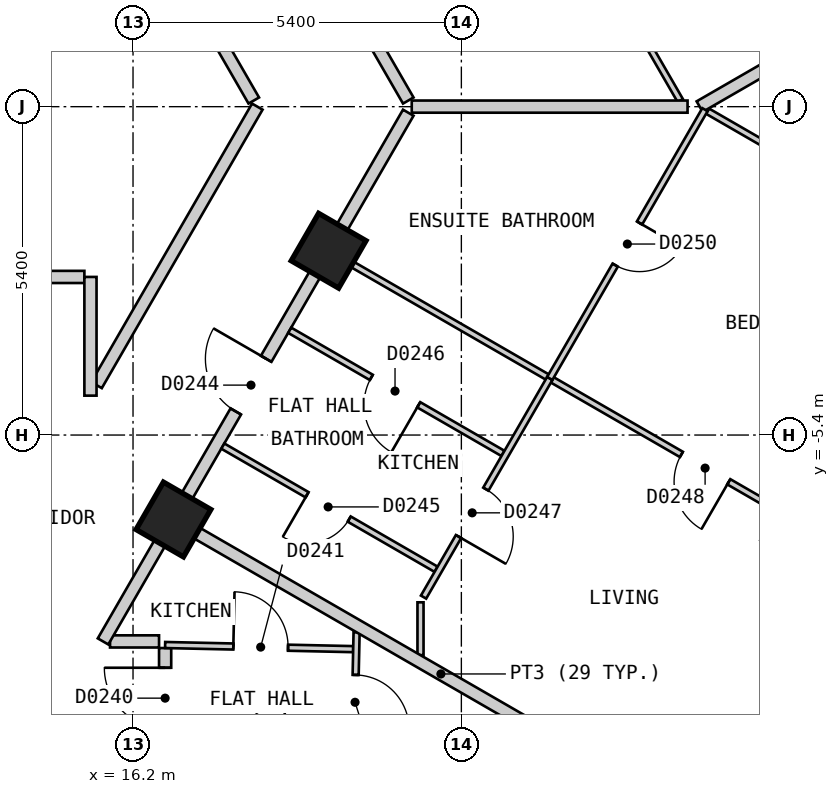
"""IFC4 building model, lengths in metres.
Left out: names, types, materials, properties, quantities, classifications, styles, units other than length and angle.
Written with IfcOpenShell. Run it as: python <this file> out.ifc"""

import sys

from ifc_helpers import new_model, si_unit, direction, frame, frame_2d, origin, origin_2d, place, context, subcontext, project, spatial, polyline, rectangle, outline, extrude, element, fill, save


model = new_model("IFC4")
c1 = context("Model", 3, precision=1e-05, world=origin(), true_north=direction((0.0, 1.0)))
c2 = subcontext(c1, "Body", "Model", "MODEL_VIEW")
j1 = project(units=[si_unit("LENGTHUNIT", "METRE"), si_unit("PLANEANGLEUNIT", "RADIAN")], contexts=[c1])
p1 = place(None, origin())
s1 = spatial("IfcSite", under=j1, at=p1, CompositionType="ELEMENT")
p2 = place(p1, origin())
s2 = spatial("IfcBuilding", under=s1, at=p2, CompositionType="ELEMENT")
p3 = place(p2, frame((0.0, 0.0, 47.4)))
s3 = spatial("IfcBuildingStorey", under=s2, at=p3, CompositionType="ELEMENT", Elevation=47.4)
for number, where, z_axis, x_axis in (
    (1, (16.865, -6.789, 0.0), (0.0, 0.0, 1.0), (0.5, 0.866, 0.0)),
    (2, (19.417, -2.369, 0.0), (0.0, 0.0, 1.0), (0.5, 0.866, 0.0)),
):
    element("IfcColumn", number, at=place(p3, frame(where, z_axis=z_axis, x_axis=x_axis)), inside=s3, PredefinedType="COLUMN", context=c2, shape_type="SweptSolid", body=[
        extrude(rectangle(XDim=0.9, YDim=0.9, at=origin_2d()), origin(), (0.0, 0.0, 1.0), 3.0),
    ])
p4 = place(p3, frame((17.71, -25.825, 0.0), z_axis=(0.0, 0.0, 1.0), x_axis=(0.500001938803, 0.866024284413, 0.0)))
e3 = element("IfcWall", 3, at=p4, inside=s3, PredefinedType="SOLIDWALL", context=c2, shape_type="SweptSolid", body=[
    extrude(outline(polyline([(0.0, -0.15), (27.02, -0.15), (26.94, 0.15), (0.08, 0.15), (0.0, -0.15)])), origin(), (0.0, 0.0, 1.0), 2.7),
])
p5 = place(p4, frame((1.277, 0.0, 0.15)))
e4 = element("IfcOpeningElement", 4, at=p5, cuts=e3, PredefinedType="OPENING", context=c2, shape_type="SweptSolid", body=[
    extrude(rectangle(XDim=1.5, YDim=2.1, at=frame_2d((0.75, 1.05))), frame((0.0, 0.16, 0.0), z_axis=(0.0, -1.0, 0.0), x_axis=(1.0, 0.0, 0.0)), (0.0, 0.0, 1.0), 0.32),
])
p6 = place(p4, frame((3.829, 0.0, 0.15)))
e5 = element("IfcOpeningElement", 5, at=p6, cuts=e3, PredefinedType="OPENING", context=c2, shape_type="SweptSolid", body=[
    extrude(rectangle(XDim=1.5, YDim=2.1, at=frame_2d((0.75, 1.05))), frame((0.0, 0.16, 0.0), z_axis=(0.0, -1.0, 0.0), x_axis=(1.0, 0.0, 0.0)), (0.0, 0.0, 1.0), 0.32),
])
p7 = place(p4, frame((6.382, 0.0, 0.15)))
e6 = element("IfcOpeningElement", 6, at=p7, cuts=e3, PredefinedType="OPENING", context=c2, shape_type="SweptSolid", body=[
    extrude(rectangle(XDim=1.5, YDim=2.1, at=frame_2d((0.75, 1.05))), frame((0.0, 0.16, 0.0), z_axis=(0.0, -1.0, 0.0), x_axis=(1.0, 0.0, 0.0)), (0.0, 0.0, 1.0), 0.32),
])
p8 = place(p4, frame((8.933, 0.0, 0.15)))
e7 = element("IfcOpeningElement", 7, at=p8, cuts=e3, PredefinedType="OPENING", context=c2, shape_type="SweptSolid", body=[
    extrude(rectangle(XDim=1.5, YDim=2.1, at=frame_2d((0.75, 1.05))), frame((0.0, 0.16, 0.0), z_axis=(0.0, -1.0, 0.0), x_axis=(1.0, 0.0, 0.0)), (0.0, 0.0, 1.0), 0.32),
])
p9 = place(p4, frame((11.485, 0.0, 0.15)))
e8 = element("IfcOpeningElement", 8, at=p9, cuts=e3, PredefinedType="OPENING", context=c2, shape_type="SweptSolid", body=[
    extrude(rectangle(XDim=1.5, YDim=2.1, at=frame_2d((0.75, 1.05))), frame((0.0, 0.16, 0.0), z_axis=(0.0, -1.0, 0.0), x_axis=(1.0, 0.0, 0.0)), (0.0, 0.0, 1.0), 0.32),
])
p10 = place(p4, frame((14.037, 0.0, 0.15)))
e9 = element("IfcOpeningElement", 9, at=p10, cuts=e3, PredefinedType="OPENING", context=c2, shape_type="SweptSolid", body=[
    extrude(rectangle(XDim=1.5, YDim=2.1, at=frame_2d((0.75, 1.05))), frame((0.0, 0.16, 0.0), z_axis=(0.0, -1.0, 0.0), x_axis=(1.0, 0.0, 0.0)), (0.0, 0.0, 1.0), 0.32),
])
p11 = place(p4, frame((16.589, 0.0, 0.15)))
e10 = element("IfcOpeningElement", 10, at=p11, cuts=e3, PredefinedType="OPENING", context=c2, shape_type="SweptSolid", body=[
    extrude(rectangle(XDim=1.5, YDim=2.1, at=frame_2d((0.75, 1.05))), frame((0.0, 0.16, 0.0), z_axis=(0.0, -1.0, 0.0), x_axis=(1.0, 0.0, 0.0)), (0.0, 0.0, 1.0), 0.32),
])
p12 = place(p4, frame((19.141, 0.0, 0.15)))
e11 = element("IfcOpeningElement", 11, at=p12, cuts=e3, PredefinedType="OPENING", context=c2, shape_type="SweptSolid", body=[
    extrude(rectangle(XDim=1.5, YDim=2.1, at=frame_2d((0.75, 1.05))), frame((0.0, 0.16, 0.0), z_axis=(0.0, -1.0, 0.0), x_axis=(1.0, 0.0, 0.0)), (0.0, 0.0, 1.0), 0.32),
])
p13 = place(p4, frame((21.693, 0.0, 0.15)))
e12 = element("IfcOpeningElement", 12, at=p13, cuts=e3, PredefinedType="OPENING", context=c2, shape_type="SweptSolid", body=[
    extrude(rectangle(XDim=1.5, YDim=2.1, at=frame_2d((0.75, 1.05))), frame((0.0, 0.16, 0.0), z_axis=(0.0, -1.0, 0.0), x_axis=(1.0, 0.0, 0.0)), (0.0, 0.0, 1.0), 0.32),
])
p14 = place(p4, frame((24.244, 0.0, 0.15)))
e13 = element("IfcOpeningElement", 13, at=p14, cuts=e3, PredefinedType="OPENING", context=c2, shape_type="SweptSolid", body=[
    extrude(rectangle(XDim=1.5, YDim=2.1, at=frame_2d((0.75, 1.05))), frame((0.0, 0.16, 0.0), z_axis=(0.0, -1.0, 0.0), x_axis=(1.0, 0.0, 0.0)), (0.0, 0.0, 1.0), 0.32),
])
p15 = place(p3, frame((9.18, 15.7, 0.0), z_axis=(0.0, 0.0, 1.0), x_axis=(0.500003652032, -0.866023295272, 0.0)))
e14 = element("IfcWall", 14, at=p15, inside=s3, PredefinedType="PARTITIONING", context=c2, shape_type="SweptSolid", body=[
    extrude(rectangle(XDim=18.012, YDim=0.2, at=frame_2d((9.006, 0.0))), origin(), (0.0, 0.0, 1.0), 2.7),
])
p16 = place(p15, frame((8.556, 0.0, 0.0)))
e15 = element("IfcOpeningElement", 15, at=p16, cuts=e14, PredefinedType="OPENING", context=c2, shape_type="SweptSolid", body=[
    extrude(rectangle(XDim=0.9, YDim=2.1, at=frame_2d((0.45, 1.05))), frame((0.0, 0.11, 0.0), z_axis=(0.0, -1.0, 0.0), x_axis=(1.0, 0.0, 0.0)), (0.0, 0.0, 1.0), 0.22),
])
p17 = place(p3, frame((10.45, 17.9, 0.0), z_axis=(0.0, 0.0, 1.0), x_axis=(0.500034352617, -0.866005569383, 0.0)))
e16 = element("IfcWall", 16, at=p17, inside=s3, PredefinedType="PARTITIONING", context=c2, shape_type="SweptSolid", body=[
    extrude(rectangle(XDim=20.553, YDim=0.2, at=frame_2d((10.276, 0.0))), origin(), (0.0, 0.0, 1.0), 2.7),
])
p18 = place(p17, frame((14.879, 0.0, 0.0)))
e17 = element("IfcOpeningElement", 17, at=p18, cuts=e16, PredefinedType="OPENING", context=c2, shape_type="SweptSolid", body=[
    extrude(rectangle(XDim=1.0, YDim=2.1, at=frame_2d((0.5, 1.05))), frame((0.0, 0.11, 0.0), z_axis=(0.0, -1.0, 0.0), x_axis=(1.0, 0.0, 0.0)), (0.0, 0.0, 1.0), 0.22),
])
p19 = place(p17, frame((9.775, 0.0, 0.0)))
e18 = element("IfcOpeningElement", 18, at=p19, cuts=e16, PredefinedType="OPENING", context=c2, shape_type="SweptSolid", body=[
    extrude(rectangle(XDim=1.0, YDim=2.1, at=frame_2d((0.5, 1.05))), frame((0.0, 0.11, 0.0), z_axis=(0.0, -1.0, 0.0), x_axis=(1.0, 0.0, 0.0)), (0.0, 0.0, 1.0), 0.22),
])
p20 = place(p17, frame((4.671, 0.0, 0.0)))
e19 = element("IfcOpeningElement", 19, at=p20, cuts=e16, PredefinedType="OPENING", context=c2, shape_type="SweptSolid", body=[
    extrude(rectangle(XDim=1.0, YDim=2.1, at=frame_2d((0.5, 1.05))), frame((0.0, 0.11, 0.0), z_axis=(0.0, -1.0, 0.0), x_axis=(1.0, 0.0, 0.0)), (0.0, 0.0, 1.0), 0.22),
])
p21 = place(p3, frame((15.822, -8.794, 0.0), z_axis=(0.0, 0.0, 1.0), x_axis=(1.0, 0.0, 0.0)))
e20 = element("IfcWall", 20, at=p21, inside=s3, PredefinedType="PARTITIONING", context=c2, shape_type="SweptSolid", body=[
    extrude(rectangle(XDim=0.806, YDim=0.2, at=frame_2d((0.403, 0.0))), origin(), (0.0, 0.0, 1.0), 2.7),
])
p22 = place(p3, frame((7.028, -2.8, 0.0), z_axis=(0.0, 0.0, 1.0), x_axis=(1.0, 0.0, 0.0)))
e21 = element("IfcWall", 21, at=p22, inside=s3, PredefinedType="PARTITIONING", context=c2, shape_type="SweptSolid", body=[
    extrude(rectangle(XDim=8.372, YDim=0.2, at=frame_2d((4.186, 0.0))), origin(), (0.0, 0.0, 1.0), 2.7),
])
p23 = place(p3, frame((15.6, -4.579, 0.0), z_axis=(0.0, 0.0, 1.0), x_axis=(0.499927597274, 0.866067201483, 0.0)))
e22 = element("IfcWall", 22, at=p23, inside=s3, PredefinedType="PARTITIONING", context=c2, shape_type="SweptSolid", body=[
    extrude(rectangle(XDim=5.288, YDim=0.2, at=frame_2d((2.644, 0.0))), origin(), (0.0, 0.0, 1.0), 2.7),
])
p24 = place(p3, frame((15.707, -8.794, 0.0), z_axis=(0.0, 0.0, 1.0), x_axis=(0.500040469623, 0.866002037376, 0.0)))
e23 = element("IfcWall", 23, at=p24, inside=s3, PredefinedType="PARTITIONING", context=c2, shape_type="SweptSolid", body=[
    extrude(rectangle(XDim=2.281, YDim=0.2, at=frame_2d((1.141, 0.0))), origin(), (0.0, 0.0, 1.0), 2.7),
])
p25 = place(p3, frame((16.864, -6.789, 0.0), z_axis=(0.0, 0.0, 1.0), x_axis=(0.500058020612, 0.865991902977, 0.0)))
e24 = element("IfcWall", 24, at=p25, inside=s3, PredefinedType="PARTITIONING", context=c2, shape_type="SweptSolid", body=[
    extrude(rectangle(XDim=7.725, YDim=0.2, at=frame_2d((3.863, 0.0))), origin(), (0.0, 0.0, 1.0), 2.7),
])
p26 = place(p25, frame((2.052, 0.0, 0.0)))
e25 = element("IfcOpeningElement", 25, at=p26, cuts=e24, PredefinedType="OPENING", context=c2, shape_type="SweptSolid", body=[
    extrude(rectangle(XDim=1.0, YDim=2.1, at=frame_2d((0.5, 1.05))), frame((0.0, 0.11, 0.0), z_axis=(0.0, -1.0, 0.0), x_axis=(1.0, 0.0, 0.0)), (0.0, 0.0, 1.0), 0.22),
])
p27 = place(p3, frame((15.5, -4.752, 0.0), z_axis=(0.0, 0.0, 1.0), x_axis=(0.0, 1.0, 0.0)))
e26 = element("IfcWall", 26, at=p27, inside=s3, PredefinedType="PARTITIONING", context=c2, shape_type="SweptSolid", body=[
    extrude(rectangle(XDim=1.952, YDim=0.2, at=frame_2d((0.976, 0.0))), origin(), (0.0, 0.0, 1.0), 2.7),
])
p28 = place(p3, frame((16.728, -13.624, 0.0), z_axis=(0.0, 0.0, 1.0), x_axis=(0.0, 1.0, 0.0)))
e27 = element("IfcWall", 27, at=p28, inside=s3, PredefinedType="PARTITIONING", context=c2, shape_type="SweptSolid", body=[
    extrude(rectangle(XDim=4.721, YDim=0.2, at=frame_2d((2.36, 0.0))), origin(), (0.0, 0.0, 1.0), 2.7),
])
p29 = place(p28, frame((3.397, 0.0, 0.0)))
e28 = element("IfcOpeningElement", 28, at=p29, cuts=e27, PredefinedType="OPENING", context=c2, shape_type="SweptSolid", body=[
    extrude(rectangle(XDim=1.0, YDim=2.1, at=frame_2d((0.5, 1.05))), frame((0.0, 0.11, 0.0), z_axis=(0.0, -1.0, 0.0), x_axis=(1.0, 0.0, 0.0)), (0.0, 0.0, 1.0), 0.22),
])
p30 = place(p3, frame((22.796, 4.264, 0.0), z_axis=(0.0, 0.0, 1.0), x_axis=(0.500099052605, -0.865968208183, 0.0)))
e29 = element("IfcWall", 29, at=p30, inside=s3, PredefinedType="PARTITIONING", context=c2, shape_type="SweptSolid", body=[
    extrude(rectangle(XDim=4.807, YDim=0.1, at=frame_2d((2.404, 0.0))), origin(), (0.0, 0.0, 1.0), 2.7),
])
p31 = place(p30, frame((2.037, 0.0, 0.0)))
e30 = element("IfcOpeningElement", 30, at=p31, cuts=e29, PredefinedType="OPENING", context=c2, shape_type="SweptSolid", body=[
    extrude(rectangle(XDim=0.8, YDim=2.1, at=frame_2d((0.4, 1.05))), frame((0.0, 0.06, 0.0), z_axis=(0.0, -1.0, 0.0), x_axis=(1.0, 0.0, 0.0)), (0.0, 0.0, 1.0), 0.12),
])
p32 = place(p3, frame((16.728, -8.853, 0.0), z_axis=(0.0, 0.0, 1.0), x_axis=(0.999759332126, -0.021938045176, 0.0)))
e31 = element("IfcWall", 31, at=p32, inside=s3, PredefinedType="PARTITIONING", context=c2, shape_type="SweptSolid", body=[
    extrude(rectangle(XDim=3.094, YDim=0.1, at=frame_2d((1.547, 0.0))), origin(), (0.0, 0.0, 1.0), 2.7),
])
p33 = place(p32, frame((1.122, 0.0, 0.0)))
e32 = element("IfcOpeningElement", 32, at=p33, cuts=e31, PredefinedType="OPENING", context=c2, shape_type="SweptSolid", body=[
    extrude(rectangle(XDim=0.9, YDim=2.1, at=frame_2d((0.45, 1.05))), frame((0.0, 0.06, 0.0), z_axis=(0.0, -1.0, 0.0), x_axis=(1.0, 0.0, 0.0)), (0.0, 0.0, 1.0), 0.12),
])
p34 = place(p3, frame((17.677, -5.582, 0.0), z_axis=(0.0, 0.0, 1.0), x_axis=(0.866015917575, -0.500016430238, 0.0)))
e33 = element("IfcWall", 33, at=p34, inside=s3, PredefinedType="PARTITIONING", context=c2, shape_type="SweptSolid", body=[
    extrude(rectangle(XDim=4.05, YDim=0.1, at=frame_2d((2.025, 0.0))), origin(), (0.0, 0.0, 1.0), 2.7),
])
p35 = place(p34, frame((1.6, 0.0, 0.0)))
e34 = element("IfcOpeningElement", 34, at=p35, cuts=e33, PredefinedType="OPENING", context=c2, shape_type="SweptSolid", body=[
    extrude(rectangle(XDim=0.8, YDim=2.1, at=frame_2d((0.4, 1.05))), frame((0.0, 0.06, 0.0), z_axis=(0.0, -1.0, 0.0), x_axis=(1.0, 0.0, 0.0)), (0.0, 0.0, 1.0), 0.12),
])
p36 = place(p3, frame((18.777, -3.677, 0.0), z_axis=(0.0, 0.0, 1.0), x_axis=(0.866000843773, -0.500042536776, 0.0)))
e35 = element("IfcWall", 35, at=p36, inside=s3, PredefinedType="PARTITIONING", context=c2, shape_type="SweptSolid", body=[
    extrude(rectangle(XDim=4.05, YDim=0.1, at=frame_2d((2.025, 0.0))), origin(), (0.0, 0.0, 1.0), 2.7),
])
p37 = place(p36, frame((1.55, 0.0, 0.0)))
e36 = element("IfcOpeningElement", 36, at=p37, cuts=e35, PredefinedType="OPENING", context=c2, shape_type="SweptSolid", body=[
    extrude(rectangle(XDim=0.9, YDim=2.1, at=frame_2d((0.45, 1.05))), frame((0.0, 0.06, 0.0), z_axis=(0.0, -1.0, 0.0), x_axis=(1.0, 0.0, 0.0)), (0.0, 0.0, 1.0), 0.12),
])
p38 = place(p3, frame((19.503, -2.419, 0.0), z_axis=(0.0, 0.0, 1.0), x_axis=(0.866047370643, -0.499961950354, 0.0)))
e37 = element("IfcWall", 37, at=p38, inside=s3, PredefinedType="PARTITIONING", context=c2, shape_type="SweptSolid", body=[
    extrude(rectangle(XDim=10.001, YDim=0.1, at=frame_2d((5.0, 0.0))), origin(), (0.0, 0.0, 1.0), 2.7),
])
p39 = place(p38, frame((6.6, 0.0, 0.0)))
e38 = element("IfcOpeningElement", 38, at=p39, cuts=e37, PredefinedType="OPENING", context=c2, shape_type="SweptSolid", body=[
    extrude(rectangle(XDim=0.9, YDim=2.1, at=frame_2d((0.45, 1.05))), frame((0.0, 0.06, 0.0), z_axis=(0.0, -1.0, 0.0), x_axis=(1.0, 0.0, 0.0)), (0.0, 0.0, 1.0), 0.12),
])
p40 = place(p3, frame((25.649, -0.074, 0.0), z_axis=(0.0, 0.0, 1.0), x_axis=(0.866059819573, -0.499940385368, 0.0)))
e39 = element("IfcWall", 39, at=p40, inside=s3, PredefinedType="PARTITIONING", context=c2, shape_type="SweptSolid", body=[
    extrude(rectangle(XDim=5.851, YDim=0.1, at=frame_2d((2.925, 0.0))), origin(), (0.0, 0.0, 1.0), 2.7),
])
p41 = place(p40, frame((2.45, 0.0, 0.0)))
e40 = element("IfcOpeningElement", 40, at=p41, cuts=e39, PredefinedType="OPENING", context=c2, shape_type="SweptSolid", body=[
    extrude(rectangle(XDim=0.9, YDim=2.1, at=frame_2d((0.45, 1.05))), frame((0.0, 0.06, 0.0), z_axis=(0.0, -1.0, 0.0), x_axis=(1.0, 0.0, 0.0)), (0.0, 0.0, 1.0), 0.12),
])
p42 = place(p3, frame((20.978, -8.065, 0.0), z_axis=(0.0, 0.0, 1.0), x_axis=(0.499965068118, 0.866045570776, 0.0)))
e41 = element("IfcWall", 41, at=p42, inside=s3, PredefinedType="PARTITIONING", context=c2, shape_type="SweptSolid", body=[
    extrude(rectangle(XDim=4.152, YDim=0.1, at=frame_2d((2.076, 0.0))), origin(), (0.0, 0.0, 1.0), 2.7),
])
p43 = place(p42, frame((1.15, 0.0, 0.0)))
e42 = element("IfcOpeningElement", 42, at=p43, cuts=e41, PredefinedType="OPENING", context=c2, shape_type="SweptSolid", body=[
    extrude(rectangle(XDim=0.9, YDim=2.1, at=frame_2d((0.45, 1.05))), frame((0.0, 0.06, 0.0), z_axis=(0.0, -1.0, 0.0), x_axis=(1.0, 0.0, 0.0)), (0.0, 0.0, 1.0), 0.12),
])
p44 = place(p3, frame((19.787, -12.704, 0.0), z_axis=(0.0, 0.0, 1.0), x_axis=(0.02212326712, 0.999755250575, 0.0)))
e43 = element("IfcWall", 43, at=p44, inside=s3, PredefinedType="PARTITIONING", context=c2, shape_type="SweptSolid", body=[
    extrude(rectangle(XDim=4.061, YDim=0.1, at=frame_2d((2.031, 0.0))), origin(), (0.0, 0.0, 1.0), 2.7),
])
p45 = place(p44, frame((2.46, 0.0, 0.0)))
e44 = element("IfcOpeningElement", 44, at=p45, cuts=e43, PredefinedType="OPENING", context=c2, shape_type="SweptSolid", body=[
    extrude(rectangle(XDim=0.9, YDim=2.1, at=frame_2d((0.45, 1.05))), frame((0.0, 0.06, 0.0), z_axis=(0.0, -1.0, 0.0), x_axis=(1.0, 0.0, 0.0)), (0.0, 0.0, 1.0), 0.12),
])
p46 = place(p3, frame((20.928, -9.02, 0.0), z_axis=(0.0, 0.0, 1.0), x_axis=(0.0, 1.0, 0.0)))
e45 = element("IfcWall", 45, at=p46, inside=s3, PredefinedType="PARTITIONING", context=c2, shape_type="SweptSolid", body=[
    extrude(rectangle(XDim=0.869, YDim=0.1, at=frame_2d((0.435, 0.0))), origin(), (0.0, 0.0, 1.0), 2.7),
])
p47 = place(p3, frame((16.916, -6.819, 0.0), z_axis=(0.0, 0.0, 1.0), x_axis=(0.866028876723, -0.499993984646, 0.0)))
e46 = element("IfcWall", 46, at=p47, inside=s3, PredefinedType="PARTITIONING", context=c2, shape_type="SweptSolid", body=[
    extrude(rectangle(XDim=10.04, YDim=0.2, at=frame_2d((5.02, 0.0))), origin(), (0.0, 0.0, 1.0), 2.7),
])
p48 = place(p3, frame((20.784, 0.001, 0.0), z_axis=(0.0, 0.0, 1.0), x_axis=(1.0, 0.0, 0.0)))
e47 = element("IfcWall", 47, at=p48, inside=s3, PredefinedType="PARTITIONING", context=c2, shape_type="SweptSolid", body=[
    extrude(rectangle(XDim=4.536, YDim=0.2, at=frame_2d((2.268, 0.0))), origin(), (0.0, 0.0, 1.0), 2.7),
])
p49 = place(p3, frame((25.519, 0.001, 0.0), z_axis=(0.0, 0.0, 1.0), x_axis=(0.86609140076, 0.499885672459, 0.0)))
e48 = element("IfcWall", 48, at=p49, inside=s3, PredefinedType="PARTITIONING", context=c2, shape_type="SweptSolid", body=[
    extrude(rectangle(XDim=6.0, YDim=0.2, at=frame_2d((3.0, 0.0))), origin(), (0.0, 0.0, 1.0), 2.7),
])
p50 = place(p3, frame((23.054, -4.469, 0.0), z_axis=(0.0, 0.0, 1.0), x_axis=(0.500023345639, 0.866011924754, 0.0)))
e49 = element("IfcWall", 49, at=p50, inside=s3, PredefinedType="PARTITIONING", context=c2, shape_type="SweptSolid", body=[
    extrude(rectangle(XDim=5.104, YDim=0.1, at=frame_2d((2.552, 0.0))), origin(), (0.0, 0.0, 1.0), 2.7),
])
p51 = place(p50, frame((2.152, 0.0, 0.0)))
e50 = element("IfcOpeningElement", 50, at=p51, cuts=e49, PredefinedType="OPENING", context=c2, shape_type="SweptSolid", body=[
    extrude(rectangle(XDim=0.8, YDim=2.1, at=frame_2d((0.4, 1.05))), frame((0.0, 0.06, 0.0), z_axis=(0.0, -1.0, 0.0), x_axis=(1.0, 0.0, 0.0)), (0.0, 0.0, 1.0), 0.12),
])
p52 = place(p29, origin())
e51 = element("IfcDoor", 51, at=p52, inside=s3, OperationType="SINGLE_SWING_RIGHT", PredefinedType="DOOR", context=c2, shape_type="SweptSolid", body=[
    extrude(rectangle(XDim=1.0, YDim=2.1, at=frame_2d((0.5, 1.05))), frame((0.0, 0.025, 0.0), z_axis=(0.0, -1.0, 0.0), x_axis=(1.0, 0.0, 0.0)), (0.0, 0.0, 1.0), 0.05),
])
fill(e28, e51)
p53 = place(p33, origin())
e52 = element("IfcDoor", 52, at=p53, inside=s3, OperationType="SINGLE_SWING_LEFT", PredefinedType="DOOR", context=c2, shape_type="SweptSolid", body=[
    extrude(rectangle(XDim=0.9, YDim=2.1, at=frame_2d((0.45, 1.05))), frame((0.0, 0.025, 0.0), z_axis=(0.0, -1.0, 0.0), x_axis=(1.0, 0.0, 0.0)), (0.0, 0.0, 1.0), 0.05),
])
fill(e32, e52)
p54 = place(p45, origin())
e53 = element("IfcDoor", 53, at=p54, inside=s3, OperationType="SINGLE_SWING_LEFT", PredefinedType="DOOR", context=c2, shape_type="SweptSolid", body=[
    extrude(rectangle(XDim=0.9, YDim=2.1, at=frame_2d((0.45, 1.05))), frame((0.0, 0.025, 0.0), z_axis=(0.0, -1.0, 0.0), x_axis=(1.0, 0.0, 0.0)), (0.0, 0.0, 1.0), 0.05),
])
fill(e44, e53)
p55 = place(p26, origin())
e54 = element("IfcDoor", 54, at=p55, inside=s3, OperationType="SINGLE_SWING_RIGHT", PredefinedType="DOOR", context=c2, shape_type="SweptSolid", body=[
    extrude(rectangle(XDim=1.0, YDim=2.1, at=frame_2d((0.5, 1.05))), frame((0.0, 0.025, 0.0), z_axis=(0.0, -1.0, 0.0), x_axis=(1.0, 0.0, 0.0)), (0.0, 0.0, 1.0), 0.05),
])
fill(e25, e54)
p56 = place(p35, origin())
e55 = element("IfcDoor", 55, at=p56, inside=s3, OperationType="SINGLE_SWING_LEFT", PredefinedType="DOOR", context=c2, shape_type="SweptSolid", body=[
    extrude(rectangle(XDim=0.8, YDim=2.1, at=frame_2d((0.4, 1.05))), frame((0.0, 0.025, 0.0), z_axis=(0.0, -1.0, 0.0), x_axis=(1.0, 0.0, 0.0)), (0.0, 0.0, 1.0), 0.05),
])
fill(e34, e55)
p57 = place(p37, origin())
e56 = element("IfcDoor", 56, at=p57, inside=s3, OperationType="SINGLE_SWING_RIGHT", PredefinedType="DOOR", context=c2, shape_type="SweptSolid", body=[
    extrude(rectangle(XDim=0.9, YDim=2.1, at=frame_2d((0.45, 1.05))), frame((0.0, 0.025, 0.0), z_axis=(0.0, -1.0, 0.0), x_axis=(1.0, 0.0, 0.0)), (0.0, 0.0, 1.0), 0.05),
])
fill(e36, e56)
p58 = place(p43, origin())
e57 = element("IfcDoor", 57, at=p58, inside=s3, OperationType="SINGLE_SWING_LEFT", PredefinedType="DOOR", context=c2, shape_type="SweptSolid", body=[
    extrude(rectangle(XDim=0.9, YDim=2.1, at=frame_2d((0.45, 1.05))), frame((0.0, 0.025, 0.0), z_axis=(0.0, -1.0, 0.0), x_axis=(1.0, 0.0, 0.0)), (0.0, 0.0, 1.0), 0.05),
])
fill(e42, e57)
p59 = place(p39, origin())
e58 = element("IfcDoor", 58, at=p59, inside=s3, OperationType="SINGLE_SWING_RIGHT", PredefinedType="DOOR", context=c2, shape_type="SweptSolid", body=[
    extrude(rectangle(XDim=0.9, YDim=2.1, at=frame_2d((0.45, 1.05))), frame((0.0, 0.025, 0.0), z_axis=(0.0, -1.0, 0.0), x_axis=(1.0, 0.0, 0.0)), (0.0, 0.0, 1.0), 0.05),
])
fill(e38, e58)
p60 = place(p51, origin())
e59 = element("IfcDoor", 59, at=p60, inside=s3, OperationType="SINGLE_SWING_RIGHT", PredefinedType="DOOR", context=c2, shape_type="SweptSolid", body=[
    extrude(rectangle(XDim=0.8, YDim=2.1, at=frame_2d((0.4, 1.05))), frame((0.0, 0.025, 0.0), z_axis=(0.0, -1.0, 0.0), x_axis=(1.0, 0.0, 0.0)), (0.0, 0.0, 1.0), 0.05),
])
fill(e50, e59)
save(model, sys.argv[1])
